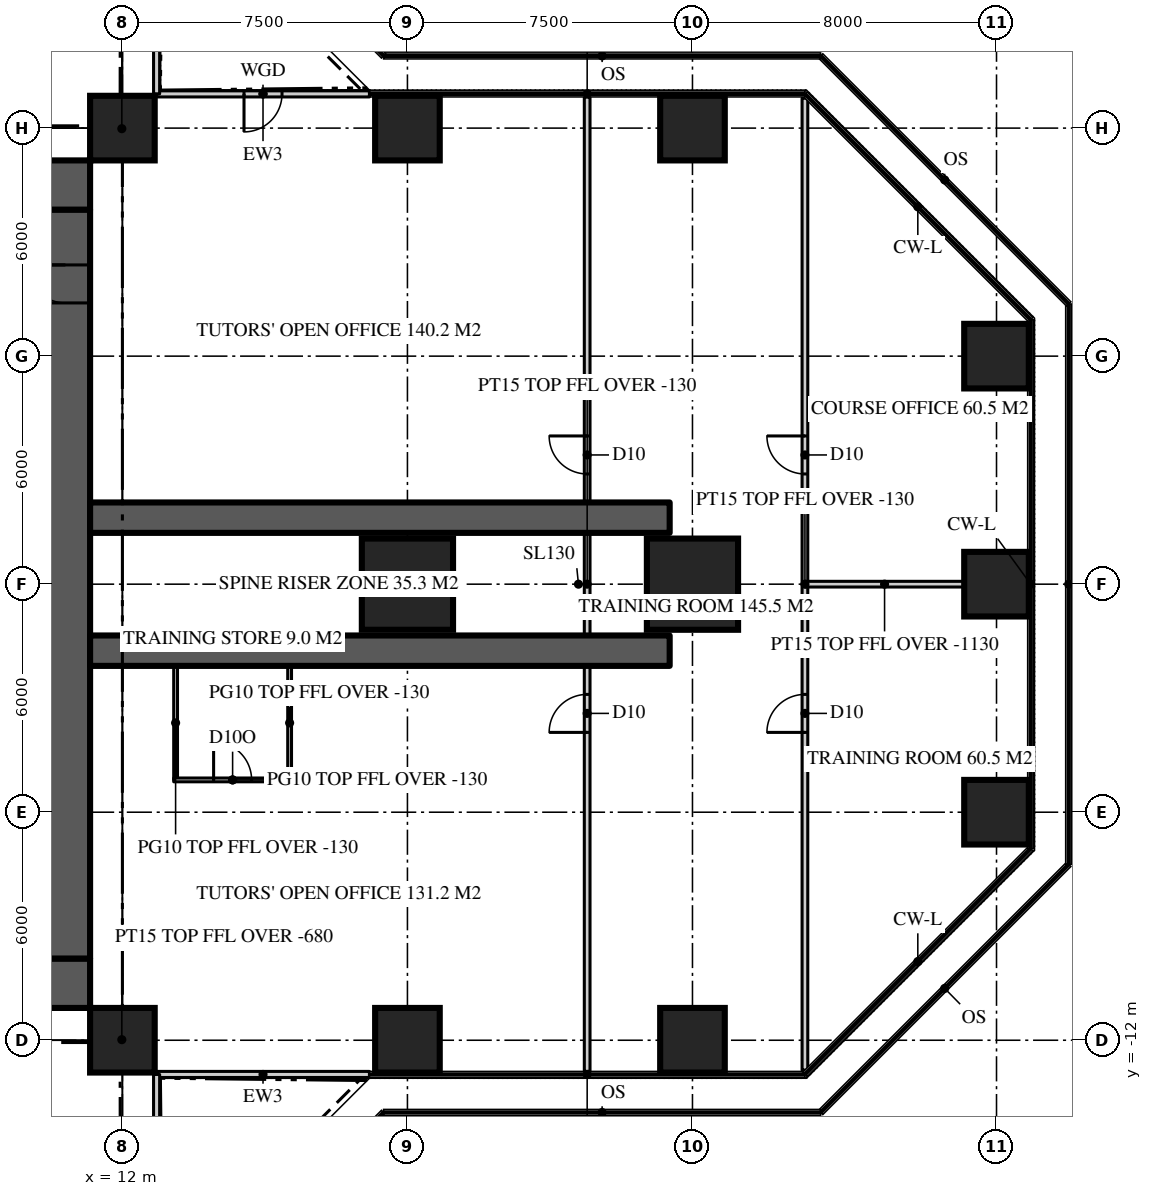
"""IFC4 building model, lengths in metres.
Left out: names, types, materials, properties, quantities, classifications, styles, units other than length and angle.
Written with IfcOpenShell. Run it as: python <this file> out.ifc"""

import sys

from ifc_helpers import new_model, si_unit, direction, frame, frame_2d, origin, origin_2d, place, context, subcontext, project, spatial, rectangle, extrude, element, fill, save


model = new_model("IFC4")
c1 = context("Model", 3, precision=1e-05, world=origin(), true_north=direction((0.0, 1.0)))
c2 = subcontext(c1, "Body", "Model", "MODEL_VIEW")
j1 = project(units=[si_unit("LENGTHUNIT", "METRE"), si_unit("PLANEANGLEUNIT", "RADIAN")], contexts=[c1])
p1 = place(None, origin())
s1 = spatial("IfcSite", under=j1, at=p1, CompositionType="ELEMENT")
p2 = place(p1, origin())
s2 = spatial("IfcBuilding", under=s1, at=p2, CompositionType="ELEMENT")
p3 = place(p2, frame((0.0, 0.0, 105.9)))
s3 = spatial("IfcBuildingStorey", under=s2, at=p3, CompositionType="ELEMENT", Elevation=105.9)
p4 = place(p3, frame((-11.15, 10.5, 0.0), z_axis=(0.0, 0.0, 1.0), x_axis=(1.0, 0.0, 0.0)))
e1 = element("IfcWall", 1, at=p4, inside=s3, PredefinedType="SHEAR", context=c2, shape_type="SweptSolid", body=[
    extrude(rectangle(XDim=22.3, YDim=1.3, at=frame_2d((11.15, 0.0))), origin(), (0.0, 0.0, 1.0), 3.9),
])
p5 = place(p4, frame((4.25, 0.0, 0.0)))
e2 = element("IfcOpeningElement", 2, at=p5, cuts=e1, PredefinedType="OPENING", context=c2, shape_type="SweptSolid", body=[
    extrude(rectangle(XDim=1.8, YDim=2.2, at=frame_2d((0.9, 1.1))), frame((0.0, 0.66, 0.0), z_axis=(0.0, -1.0, 0.0), x_axis=(1.0, 0.0, 0.0)), (0.0, 0.0, 1.0), 1.32),
])
p6 = place(p4, frame((16.25, 0.0, 0.0)))
e3 = element("IfcOpeningElement", 3, at=p6, cuts=e1, PredefinedType="OPENING", context=c2, shape_type="SweptSolid", body=[
    extrude(rectangle(XDim=1.8, YDim=2.2, at=frame_2d((0.9, 1.1))), frame((0.0, 0.66, 0.0), z_axis=(0.0, -1.0, 0.0), x_axis=(1.0, 0.0, 0.0)), (0.0, 0.0, 1.0), 1.32),
])
p7 = place(p3, frame((11.15, -10.5, 0.0), z_axis=(0.0, 0.0, 1.0), x_axis=(-1.0, 0.0, 0.0)))
e4 = element("IfcWall", 4, at=p7, inside=s3, PredefinedType="SHEAR", context=c2, shape_type="SweptSolid", body=[
    extrude(rectangle(XDim=22.3, YDim=1.3, at=frame_2d((11.15, 0.0))), origin(), (0.0, 0.0, 1.0), 3.9),
])
p8 = place(p7, frame((16.25, 0.0, 0.0)))
e5 = element("IfcOpeningElement", 5, at=p8, cuts=e4, PredefinedType="OPENING", context=c2, shape_type="SweptSolid", body=[
    extrude(rectangle(XDim=1.8, YDim=2.2, at=frame_2d((0.9, 1.1))), frame((0.0, 0.66, 0.0), z_axis=(0.0, -1.0, 0.0), x_axis=(1.0, 0.0, 0.0)), (0.0, 0.0, 1.0), 1.32),
])
p9 = place(p7, frame((4.25, 0.0, 0.0)))
e6 = element("IfcOpeningElement", 6, at=p9, cuts=e4, PredefinedType="OPENING", context=c2, shape_type="SweptSolid", body=[
    extrude(rectangle(XDim=1.8, YDim=2.2, at=frame_2d((0.9, 1.1))), frame((0.0, 0.66, 0.0), z_axis=(0.0, -1.0, 0.0), x_axis=(1.0, 0.0, 0.0)), (0.0, 0.0, 1.0), 1.32),
])
p10 = place(p3, frame((10.5, -9.85, 0.0), z_axis=(0.0, 0.0, 1.0), x_axis=(0.0, 1.0, 0.0)))
e7 = element("IfcWall", 7, at=p10, inside=s3, PredefinedType="SHEAR", context=c2, shape_type="SweptSolid", body=[
    extrude(rectangle(XDim=19.7, YDim=1.3, at=frame_2d((9.85, 0.0))), origin(), (0.0, 0.0, 1.0), 3.9),
])
p11 = place(p10, frame((17.25, 0.0, 0.0)))
e8 = element("IfcOpeningElement", 8, at=p11, cuts=e7, PredefinedType="OPENING", context=c2, shape_type="SweptSolid", body=[
    extrude(rectangle(XDim=1.0, YDim=2.2, at=frame_2d((0.5, 1.1))), frame((0.0, 0.66, 0.0), z_axis=(0.0, -1.0, 0.0), x_axis=(1.0, 0.0, 0.0)), (0.0, 0.0, 1.0), 1.32),
])
for number, where, z_axis, x_axis in (
    (9, (11.15, -1.75, 0.0), (0.0, 0.0, 1.0), (1.0, 0.0, 0.0)),
    (10, (11.15, 1.75, 0.0), (0.0, 0.0, 1.0), (1.0, 0.0, 0.0)),
):
    element("IfcWall", number, at=place(p3, frame(where, z_axis=z_axis, x_axis=x_axis)), inside=s3, PredefinedType="SHEAR", context=c2, shape_type="SweptSolid", body=[
        extrude(rectangle(XDim=15.25, YDim=0.8, at=frame_2d((7.625, 0.0))), origin(), (0.0, 0.0, 1.0), 3.9),
    ])
for number, where, z_axis, x_axis in (
    (11, (12.0, -12.0, 0.0), (0.0, 0.0, 1.0), (1.0, 0.0, 0.0)),
    (12, (19.5, -12.0, 0.0), (0.0, 0.0, 1.0), (1.0, 0.0, 0.0)),
    (13, (27.0, -12.0, 0.0), (0.0, 0.0, 1.0), (1.0, 0.0, 0.0)),
    (14, (35.0, -6.0, 0.0), (0.0, 0.0, 1.0), (1.0, 0.0, 0.0)),
):
    element("IfcColumn", number, at=place(p3, frame(where, z_axis=z_axis, x_axis=x_axis)), inside=s3, PredefinedType="COLUMN", context=c2, shape_type="SweptSolid", body=[
        extrude(rectangle(XDim=1.7, YDim=1.7, at=origin_2d()), origin(), (0.0, 0.0, 1.0), 3.9),
    ])
for number, where, z_axis, x_axis in (
    (15, (19.5, 0.0, 0.0), (0.0, 0.0, 1.0), (1.0, 0.0, 0.0)),
    (16, (27.0, 0.0, 0.0), (0.0, 0.0, 1.0), (1.0, 0.0, 0.0)),
):
    element("IfcColumn", number, at=place(p3, frame(where, z_axis=z_axis, x_axis=x_axis)), inside=s3, PredefinedType="COLUMN", context=c2, shape_type="SweptSolid", body=[
        extrude(rectangle(XDim=2.4, YDim=2.4, at=origin_2d()), origin(), (0.0, 0.0, 1.0), 3.9),
    ])
for number, where, z_axis, x_axis in (
    (17, (35.0, 0.0, 0.0), (0.0, 0.0, 1.0), (1.0, 0.0, 0.0)),
    (18, (35.0, 6.0, 0.0), (0.0, 0.0, 1.0), (1.0, 0.0, 0.0)),
    (19, (12.0, 12.0, 0.0), (0.0, 0.0, 1.0), (1.0, 0.0, 0.0)),
    (20, (19.5, 12.0, 0.0), (0.0, 0.0, 1.0), (1.0, 0.0, 0.0)),
    (21, (27.0, 12.0, 0.0), (0.0, 0.0, 1.0), (1.0, 0.0, 0.0)),
):
    element("IfcColumn", number, at=place(p3, frame(where, z_axis=z_axis, x_axis=x_axis)), inside=s3, PredefinedType="COLUMN", context=c2, shape_type="SweptSolid", body=[
        extrude(rectangle(XDim=1.7, YDim=1.7, at=origin_2d()), origin(), (0.0, 0.0, 1.0), 3.9),
    ])
p12 = place(p3, frame((12.9, -12.9, 0.0), z_axis=(0.0, 0.0, 1.0), x_axis=(1.0, 0.0, 0.0)))
e22 = element("IfcWall", 22, at=p12, inside=s3, PredefinedType="SOLIDWALL", context=c2, shape_type="SweptSolid", body=[
    extrude(rectangle(XDim=5.6, YDim=0.16, at=frame_2d((2.8, 0.0))), origin(), (0.0, 0.0, 1.0), 3.77),
])
p13 = place(p3, frame((18.5, 12.9, 0.0), z_axis=(0.0, 0.0, 1.0), x_axis=(-1.0, 0.0, 0.0)))
e23 = element("IfcWall", 23, at=p13, inside=s3, PredefinedType="SOLIDWALL", context=c2, shape_type="SweptSolid", body=[
    extrude(rectangle(XDim=5.6, YDim=0.16, at=frame_2d((2.8, 0.0))), origin(), (0.0, 0.0, 1.0), 3.77),
])
p14 = place(p13, frame((2.3, 0.0, 0.0)))
e24 = element("IfcOpeningElement", 24, at=p14, cuts=e23, PredefinedType="OPENING", context=c2, shape_type="SweptSolid", body=[
    extrude(rectangle(XDim=1.0, YDim=2.2, at=frame_2d((0.5, 1.1))), frame((0.0, 0.09, 0.0), z_axis=(0.0, -1.0, 0.0), x_axis=(1.0, 0.0, 0.0)), (0.0, 0.0, 1.0), 0.18),
])
p15 = place(p3, frame((12.9, 12.9, 0.0), z_axis=(0.0, 0.0, 1.0), x_axis=(0.0, 1.0, 0.0)))
e25 = element("IfcWall", 25, at=p15, inside=s3, PredefinedType="SOLIDWALL", context=c2, shape_type="SweptSolid", body=[
    extrude(rectangle(XDim=5.6, YDim=0.16, at=frame_2d((2.8, 0.0))), origin(), (0.0, 0.0, 1.0), 3.77),
])
p16 = place(p3, frame((12.9, -18.5, 0.0), z_axis=(0.0, 0.0, 1.0), x_axis=(0.0, 1.0, 0.0)))
e26 = element("IfcWall", 26, at=p16, inside=s3, PredefinedType="SOLIDWALL", context=c2, shape_type="SweptSolid", body=[
    extrude(rectangle(XDim=5.6, YDim=0.16, at=frame_2d((2.8, 0.0))), origin(), (0.0, 0.0, 1.0), 3.77),
])
p17 = place(p16, frame((2.3, 0.0, 0.0)))
e27 = element("IfcOpeningElement", 27, at=p17, cuts=e26, PredefinedType="OPENING", context=c2, shape_type="SweptSolid", body=[
    extrude(rectangle(XDim=1.0, YDim=2.2, at=frame_2d((0.5, 1.1))), frame((0.0, 0.09, 0.0), z_axis=(0.0, -1.0, 0.0), x_axis=(1.0, 0.0, 0.0)), (0.0, 0.0, 1.0), 0.18),
])
p18 = place(p3, frame((24.229, -12.82, 0.0), z_axis=(0.0, 0.0, 1.0), x_axis=(0.0, 1.0, 0.0)))
e28 = element("IfcWall", 28, at=p18, inside=s3, PredefinedType="PARTITIONING", context=c2, shape_type="SweptSolid", body=[
    extrude(rectangle(XDim=25.64, YDim=0.15, at=frame_2d((12.82, 0.0))), origin(), (0.0, 0.0, 1.0), 3.77),
])
p19 = place(p18, frame((15.72, 0.0, 0.0)))
e29 = element("IfcOpeningElement", 29, at=p19, cuts=e28, PredefinedType="OPENING", context=c2, shape_type="SweptSolid", body=[
    extrude(rectangle(XDim=1.0, YDim=2.2, at=frame_2d((0.5, 1.1))), frame((0.0, 0.085, 0.0), z_axis=(0.0, -1.0, 0.0), x_axis=(1.0, 0.0, 0.0)), (0.0, 0.0, 1.0), 0.17),
])
p20 = place(p18, frame((8.92, 0.0, 0.0)))
e30 = element("IfcOpeningElement", 30, at=p20, cuts=e28, PredefinedType="OPENING", context=c2, shape_type="SweptSolid", body=[
    extrude(rectangle(XDim=1.0, YDim=2.2, at=frame_2d((0.5, 1.1))), frame((0.0, 0.085, 0.0), z_axis=(0.0, -1.0, 0.0), x_axis=(1.0, 0.0, 0.0)), (0.0, 0.0, 1.0), 0.17),
])
p21 = place(p3, frame((29.959, -12.786, 0.0), z_axis=(0.0, 0.0, 1.0), x_axis=(0.0, 1.0, 0.0)))
e31 = element("IfcWall", 31, at=p21, inside=s3, PredefinedType="PARTITIONING", context=c2, shape_type="SweptSolid", body=[
    extrude(rectangle(XDim=25.573, YDim=0.15, at=frame_2d((12.786, 0.0))), origin(), (0.0, 0.0, 1.0), 3.77),
])
p22 = place(p21, frame((15.687, 0.0, 0.0)))
e32 = element("IfcOpeningElement", 32, at=p22, cuts=e31, PredefinedType="OPENING", context=c2, shape_type="SweptSolid", body=[
    extrude(rectangle(XDim=1.0, YDim=2.2, at=frame_2d((0.5, 1.1))), frame((0.0, 0.085, 0.0), z_axis=(0.0, -1.0, 0.0), x_axis=(1.0, 0.0, 0.0)), (0.0, 0.0, 1.0), 0.17),
])
p23 = place(p21, frame((8.886, 0.0, 0.0)))
e33 = element("IfcOpeningElement", 33, at=p23, cuts=e31, PredefinedType="OPENING", context=c2, shape_type="SweptSolid", body=[
    extrude(rectangle(XDim=1.0, YDim=2.2, at=frame_2d((0.5, 1.1))), frame((0.0, 0.085, 0.0), z_axis=(0.0, -1.0, 0.0), x_axis=(1.0, 0.0, 0.0)), (0.0, 0.0, 1.0), 0.17),
])
p24 = place(p3, frame((29.959, 0.0, 0.0), z_axis=(0.0, 0.0, 1.0), x_axis=(1.0, 0.0, 0.0)))
e34 = element("IfcWall", 34, at=p24, inside=s3, PredefinedType="PARTITIONING", context=c2, shape_type="SweptSolid", body=[
    extrude(rectangle(XDim=4.191, YDim=0.15, at=frame_2d((2.095, 0.0))), origin(), (0.0, 0.0, 1.0), 2.77),
])
for number, where, z_axis, x_axis in (
    (35, (13.4, -2.15, 0.0), (0.0, 0.0, 1.0), (0.0, -1.0, 0.0)),
    (36, (16.4, -2.15, 0.0), (0.0, 0.0, 1.0), (0.0, -1.0, 0.0)),
):
    element("IfcWall", number, at=place(p3, frame(where, z_axis=z_axis, x_axis=x_axis)), inside=s3, PredefinedType="PARTITIONING", context=c2, shape_type="SweptSolid", body=[
        extrude(rectangle(XDim=3.0, YDim=0.1, at=frame_2d((1.5, 0.0))), origin(), (0.0, 0.0, 1.0), 3.77),
    ])
p25 = place(p3, frame((13.35, -5.15, 0.0), z_axis=(0.0, 0.0, 1.0), x_axis=(1.0, 0.0, 0.0)))
e37 = element("IfcWall", 37, at=p25, inside=s3, PredefinedType="PARTITIONING", context=c2, shape_type="SweptSolid", body=[
    extrude(rectangle(XDim=3.1, YDim=0.1, at=frame_2d((1.55, 0.0))), origin(), (0.0, 0.0, 1.0), 3.77),
])
p26 = place(p25, frame((1.05, 0.0, 0.0)))
e38 = element("IfcOpeningElement", 38, at=p26, cuts=e37, PredefinedType="OPENING", context=c2, shape_type="SweptSolid", body=[
    extrude(rectangle(XDim=1.0, YDim=2.2, at=frame_2d((0.5, 1.1))), frame((0.0, 0.06, 0.0), z_axis=(0.0, -1.0, 0.0), x_axis=(1.0, 0.0, 0.0)), (0.0, 0.0, 1.0), 0.12),
])
for number, where, z_axis, x_axis in (
    (39, (11.15, 11.15, 0.0), (0.0, 0.0, 1.0), (0.707, 0.707, 0.0)),
    (40, (11.15, -11.15, 0.0), (0.0, 0.0, 1.0), (0.707, -0.707, 0.0)),
):
    element("IfcWall", number, at=place(p3, frame(where, z_axis=z_axis, x_axis=x_axis)), inside=s3, PredefinedType="PARTITIONING", context=c2, shape_type="SweptSolid", body=[
        extrude(rectangle(XDim=2.362, YDim=0.15, at=frame_2d((1.181, 0.0))), origin(), (0.0, 0.0, 1.0), 3.22),
    ])
p27 = place(p14, origin())
e41 = element("IfcDoor", 41, at=p27, inside=s3, OperationType="SINGLE_SWING_RIGHT", PredefinedType="DOOR", context=c2, shape_type="SweptSolid", body=[
    extrude(rectangle(XDim=1.0, YDim=2.2, at=frame_2d((0.5, 1.1))), frame((0.0, 0.025, 0.0), z_axis=(0.0, -1.0, 0.0), x_axis=(1.0, 0.0, 0.0)), (0.0, 0.0, 1.0), 0.05),
])
fill(e24, e41)
p28 = place(p11, origin())
e42 = element("IfcDoor", 42, at=p28, inside=s3, OperationType="SINGLE_SWING_RIGHT", PredefinedType="DOOR", context=c2, shape_type="SweptSolid", body=[
    extrude(rectangle(XDim=1.0, YDim=2.2, at=frame_2d((0.5, 1.1))), frame((0.0, 0.025, 0.0), z_axis=(0.0, -1.0, 0.0), x_axis=(1.0, 0.0, 0.0)), (0.0, 0.0, 1.0), 0.05),
])
fill(e8, e42)
p29 = place(p19, origin())
e43 = element("IfcDoor", 43, at=p29, inside=s3, OperationType="SINGLE_SWING_RIGHT", PredefinedType="DOOR", context=c2, shape_type="SweptSolid", body=[
    extrude(rectangle(XDim=1.0, YDim=2.2, at=frame_2d((0.5, 1.1))), frame((0.0, 0.025, 0.0), z_axis=(0.0, -1.0, 0.0), x_axis=(1.0, 0.0, 0.0)), (0.0, 0.0, 1.0), 0.05),
])
fill(e29, e43)
p30 = place(p20, origin())
e44 = element("IfcDoor", 44, at=p30, inside=s3, OperationType="SINGLE_SWING_LEFT", PredefinedType="DOOR", context=c2, shape_type="SweptSolid", body=[
    extrude(rectangle(XDim=1.0, YDim=2.2, at=frame_2d((0.5, 1.1))), frame((0.0, 0.025, 0.0), z_axis=(0.0, -1.0, 0.0), x_axis=(1.0, 0.0, 0.0)), (0.0, 0.0, 1.0), 0.05),
])
fill(e30, e44)
p31 = place(p22, origin())
e45 = element("IfcDoor", 45, at=p31, inside=s3, OperationType="SINGLE_SWING_RIGHT", PredefinedType="DOOR", context=c2, shape_type="SweptSolid", body=[
    extrude(rectangle(XDim=1.0, YDim=2.2, at=frame_2d((0.5, 1.1))), frame((0.0, 0.025, 0.0), z_axis=(0.0, -1.0, 0.0), x_axis=(1.0, 0.0, 0.0)), (0.0, 0.0, 1.0), 0.05),
])
fill(e32, e45)
p32 = place(p23, origin())
e46 = element("IfcDoor", 46, at=p32, inside=s3, OperationType="SINGLE_SWING_LEFT", PredefinedType="DOOR", context=c2, shape_type="SweptSolid", body=[
    extrude(rectangle(XDim=1.0, YDim=2.2, at=frame_2d((0.5, 1.1))), frame((0.0, 0.025, 0.0), z_axis=(0.0, -1.0, 0.0), x_axis=(1.0, 0.0, 0.0)), (0.0, 0.0, 1.0), 0.05),
])
fill(e33, e46)
p33 = place(p26, origin())
e47 = element("IfcDoor", 47, at=p33, inside=s3, OperationType="SINGLE_SWING_LEFT", PredefinedType="DOOR", context=c2, shape_type="SweptSolid", body=[
    extrude(rectangle(XDim=1.0, YDim=2.2, at=frame_2d((0.5, 1.1))), frame((0.0, 0.025, 0.0), z_axis=(0.0, -1.0, 0.0), x_axis=(1.0, 0.0, 0.0)), (0.0, 0.0, 1.0), 0.05),
])
fill(e38, e47)
save(model, sys.argv[1])
